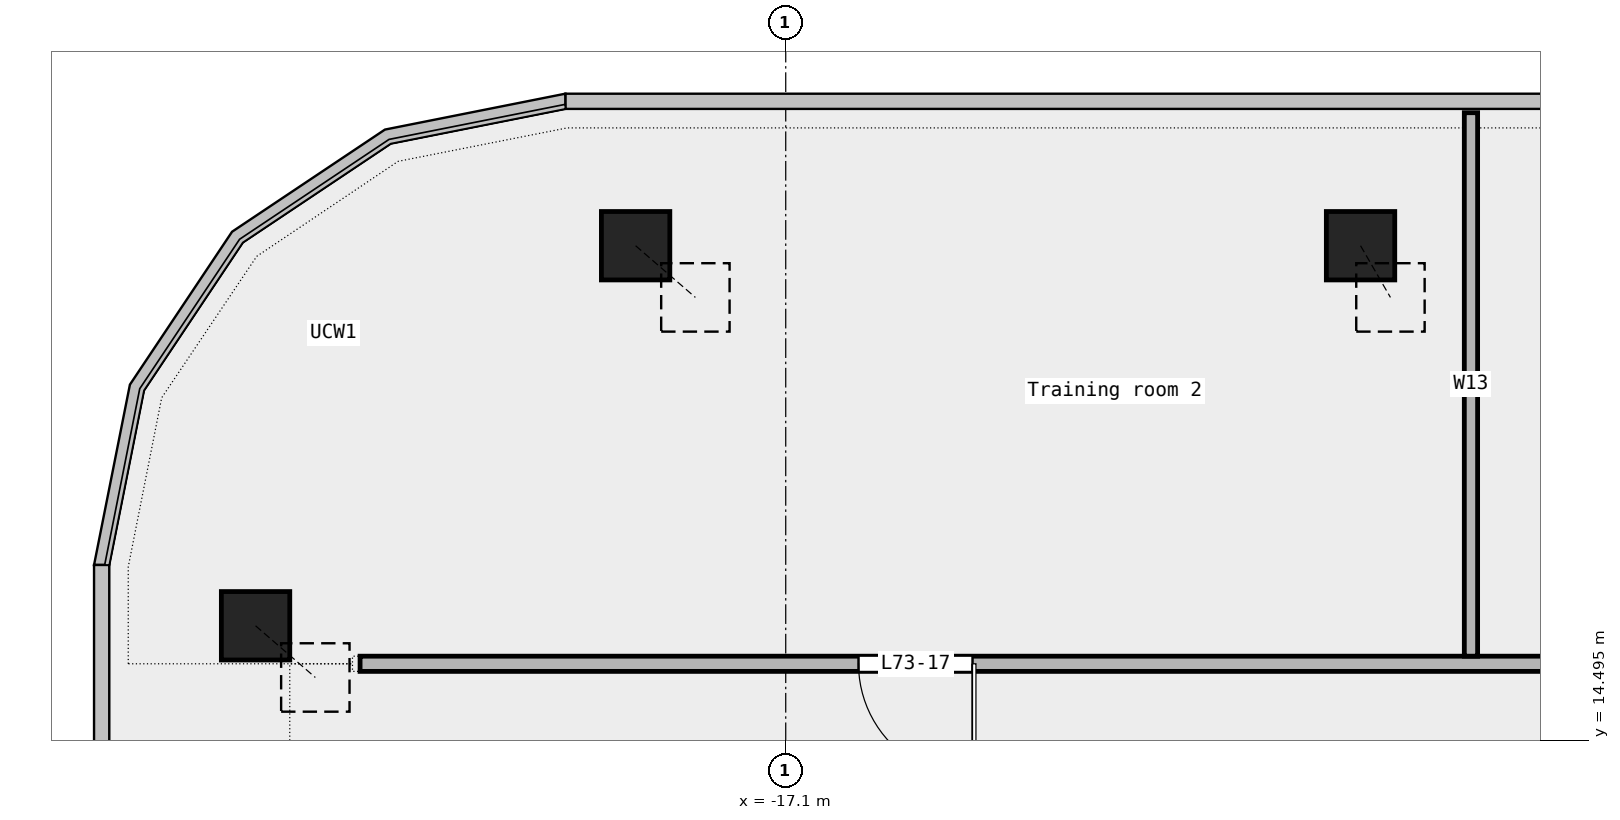
"""IFC4 building model, lengths in metres.
Left out: names, types, materials, properties, quantities, classifications, styles, units other than length and angle.
Written with IfcOpenShell. Run it as: python <this file> out.ifc"""

import sys

from ifc_helpers import new_model, si_unit, direction, frame, frame_2d, origin, origin_2d, place, context, subcontext, project, spatial, rectangle, extrude, element, fill, save


model = new_model("IFC4")
c1 = context("Model", 3, precision=1e-05, world=origin(), true_north=direction((0.0, 1.0)))
c2 = subcontext(c1, "Body", "Model", "MODEL_VIEW")
j1 = project(units=[si_unit("LENGTHUNIT", "METRE"), si_unit("PLANEANGLEUNIT", "RADIAN")], contexts=[c1])
p1 = place(None, origin())
s1 = spatial("IfcSite", under=j1, at=p1, CompositionType="ELEMENT")
p2 = place(p1, origin())
s2 = spatial("IfcBuilding", under=s1, at=p2, CompositionType="ELEMENT")
p3 = place(p2, frame((0.0, 0.0, 333.4)))
s3 = spatial("IfcBuildingStorey", under=s2, at=p3, CompositionType="ELEMENT", Elevation=333.4)
p4 = place(p3, frame((-9.538, 21.0, 0.0), z_axis=(0.112706165104, -0.194839646068, 0.974338151089), x_axis=(0.865610650408, 0.500717686825, 0.0)))
e1 = element("IfcColumn", 1, at=p4, inside=s3, PredefinedType="COLUMN", context=c2, shape_type="SweptSolid", body=[
    extrude(rectangle(XDim=0.9, YDim=0.9, at=origin_2d()), origin(), (0.0, 0.0, 1.0), 3.49),
])
for number, where, z_axis, x_axis in (
    (2, (-19.075, 21.0, 0.0), (0.221, -0.191, 0.956), (0.654, 0.756, 0.0)),
    (3, (-24.075, 16.0, 0.0), (0.221, -0.191, 0.956), (0.654, 0.756, 0.0)),
):
    element("IfcColumn", number, at=place(p3, frame(where, z_axis=z_axis, x_axis=x_axis)), inside=s3, PredefinedType="COLUMN", context=c2, shape_type="SweptSolid", body=[
        extrude(rectangle(XDim=0.9, YDim=0.9, at=origin_2d()), origin(), (0.0, 0.0, 1.0), 3.555),
    ])
p5 = place(p3, frame((-22.7, 15.5, 0.0), z_axis=(0.0, 0.0, 1.0), x_axis=(1.0, 0.0, 0.0)))
e4 = element("IfcWall", 4, at=p5, inside=s3, PredefinedType="PARTITIONING", context=c2, shape_type="SweptSolid", body=[
    extrude(rectangle(XDim=45.4, YDim=0.2, at=frame_2d((22.7, 0.0))), origin(), (0.0, 0.0, 1.0), 3.4),
])
p6 = place(p5, frame((43.542, 0.0, 0.0)))
e5 = element("IfcOpeningElement", 5, at=p6, cuts=e4, PredefinedType="OPENING", context=c2, shape_type="SweptSolid", body=[
    extrude(rectangle(XDim=0.9, YDim=2.1, at=frame_2d((0.45, 1.05))), frame((0.0, 0.112, 0.0), z_axis=(0.0, -1.0, 0.0), x_axis=(1.0, 0.0, 0.0)), (0.0, 0.0, 1.0), 0.224),
])
p7 = place(p5, frame((32.75, 0.0, 0.0)))
e6 = element("IfcOpeningElement", 6, at=p7, cuts=e4, PredefinedType="OPENING", context=c2, shape_type="SweptSolid", body=[
    extrude(rectangle(XDim=1.5, YDim=2.1, at=frame_2d((0.75, 1.05))), frame((0.0, 0.112, 0.0), z_axis=(0.0, -1.0, 0.0), x_axis=(1.0, 0.0, 0.0)), (0.0, 0.0, 1.0), 0.224),
])
p8 = place(p5, frame((18.915, 0.0, 0.0)))
e7 = element("IfcOpeningElement", 7, at=p8, cuts=e4, PredefinedType="OPENING", context=c2, shape_type="SweptSolid", body=[
    extrude(rectangle(XDim=1.2, YDim=2.1, at=frame_2d((0.6, 1.05))), frame((0.0, 0.112, 0.0), z_axis=(0.0, -1.0, 0.0), x_axis=(1.0, 0.0, 0.0)), (0.0, 0.0, 1.0), 0.224),
])
p9 = place(p5, frame((6.558, 0.0, 0.0)))
e8 = element("IfcOpeningElement", 8, at=p9, cuts=e4, PredefinedType="OPENING", context=c2, shape_type="SweptSolid", body=[
    extrude(rectangle(XDim=1.5, YDim=2.1, at=frame_2d((0.75, 1.05))), frame((0.0, 0.112, 0.0), z_axis=(0.0, -1.0, 0.0), x_axis=(1.0, 0.0, 0.0)), (0.0, 0.0, 1.0), 0.224),
])
p10 = place(p3, frame((-8.085, 15.6, 0.0), z_axis=(0.0, 0.0, 1.0), x_axis=(0.0, 1.0, 0.0)))
e9 = element("IfcWall", 9, at=p10, inside=s3, PredefinedType="PARTITIONING", context=c2, shape_type="SweptSolid", body=[
    extrude(rectangle(XDim=7.15, YDim=0.175, at=frame_2d((3.575, 0.0))), origin(), (0.0, 0.0, 1.0), 3.4),
])
p11 = place(p9, origin())
e10 = element("IfcDoor", 10, at=p11, inside=s3, OperationType="DOUBLE_DOOR_SINGLE_SWING", PredefinedType="DOOR", context=c2, shape_type="SweptSolid", body=[
    extrude(rectangle(XDim=1.5, YDim=2.1, at=frame_2d((0.75, 1.05))), frame((0.0, 0.025, 0.0), z_axis=(0.0, -1.0, 0.0), x_axis=(1.0, 0.0, 0.0)), (0.0, 0.0, 1.0), 0.05),
])
fill(e8, e10)
save(model, sys.argv[1])
